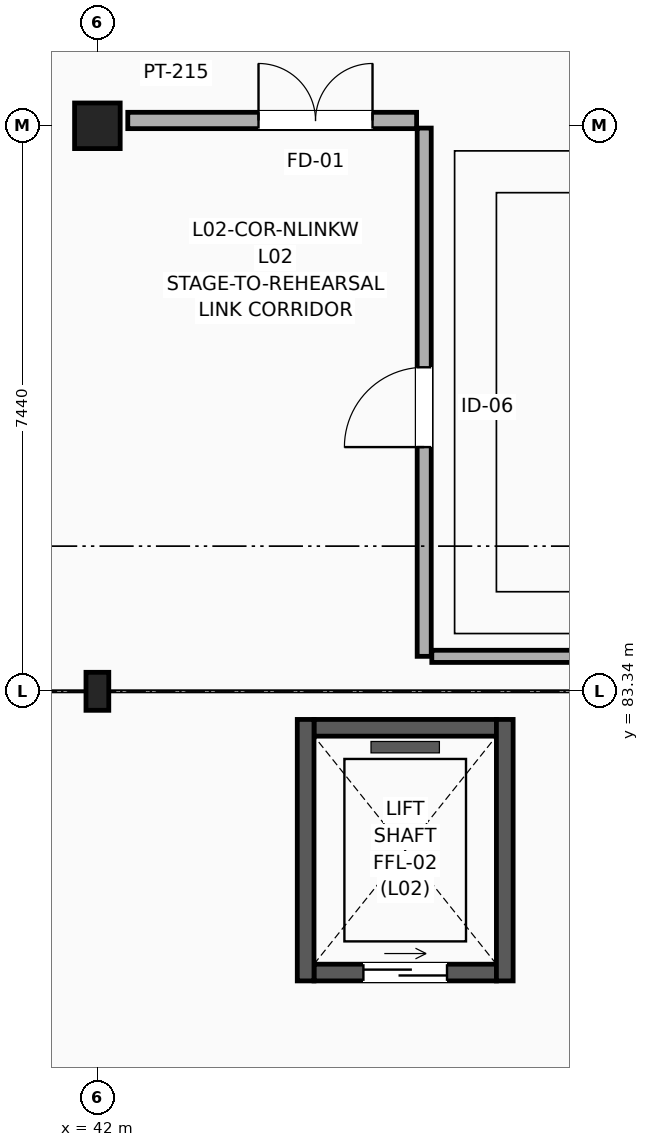
"""IFC4 building model, lengths in metres.
Left out: names, types, materials, properties, quantities, classifications, styles, units other than length and angle.
Written with IfcOpenShell. Run it as: python <this file> out.ifc"""

import sys

from ifc_helpers import new_model, si_unit, direction, frame, frame_2d, origin, origin_2d, place, context, subcontext, project, spatial, rectangle, i_section, extrude, element, fill, save


model = new_model("IFC4")
c1 = context("Model", 3, precision=1e-05, world=origin(), true_north=direction((0.0, 1.0)))
c2 = subcontext(c1, "Body", "Model", "MODEL_VIEW")
j1 = project(units=[si_unit("LENGTHUNIT", "METRE"), si_unit("PLANEANGLEUNIT", "RADIAN")], contexts=[c1])
p1 = place(None, origin())
s1 = spatial("IfcSite", under=j1, at=p1, CompositionType="ELEMENT")
p2 = place(p1, origin())
s2 = spatial("IfcBuilding", under=s1, at=p2, CompositionType="ELEMENT")
p3 = place(p2, frame((0.0, 0.0, 10.2)))
s3 = spatial("IfcBuildingStorey", under=s2, at=p3, CompositionType="ELEMENT", Elevation=10.2)
p4 = place(p3, frame((42.0, 83.34, 0.0), z_axis=(0.0, 0.0, 1.0), x_axis=(1.0, 0.0, 0.0)))
e1 = element("IfcColumn", 1, at=p4, inside=s3, PredefinedType="COLUMN", context=c2, shape_type="SweptSolid", body=[
    extrude(i_section(OverallWidth=0.3, OverallDepth=0.5, WebThickness=0.014, FlangeThickness=0.028, FilletRadius=0.027, at=origin_2d()), origin(), (0.0, 0.0, 1.0), 4.5),
])
p5 = place(p3, frame((42.0, 90.78, 0.0), z_axis=(0.0, 0.0, 1.0), x_axis=(1.0, 0.0, 0.0)))
e2 = element("IfcColumn", 2, at=p5, inside=s3, PredefinedType="COLUMN", context=c2, shape_type="SweptSolid", body=[
    extrude(rectangle(XDim=0.6, YDim=0.6, at=origin_2d()), origin(), (0.0, 0.0, 1.0), 4.5),
])
p6 = place(p3, frame((44.85, 79.64, 0.0), z_axis=(0.0, 0.0, 1.0), x_axis=(1.0, 0.0, 0.0)))
e3 = element("IfcWall", 3, at=p6, inside=s3, PredefinedType="SOLIDWALL", context=c2, shape_type="SweptSolid", body=[
    extrude(rectangle(XDim=2.4, YDim=0.22, at=frame_2d((1.2, 0.0))), origin(), (0.0, 0.0, 1.0), 4.225),
])
p7 = place(p6, frame((0.65, 0.0, 0.0)))
e4 = element("IfcOpeningElement", 4, at=p7, cuts=e3, PredefinedType="OPENING", context=c2, shape_type="SweptSolid", body=[
    extrude(rectangle(XDim=1.1, YDim=2.2, at=frame_2d((0.55, 1.1))), frame((0.0, 0.12, 0.0), z_axis=(0.0, -1.0, 0.0), x_axis=(1.0, 0.0, 0.0)), (0.0, 0.0, 1.0), 0.24),
])
p8 = place(p3, frame((44.85, 82.86, 0.0), z_axis=(0.0, 0.0, 1.0), x_axis=(1.0, 0.0, 0.0)))
e5 = element("IfcWall", 5, at=p8, inside=s3, PredefinedType="SOLIDWALL", context=c2, shape_type="SweptSolid", body=[
    extrude(rectangle(XDim=2.4, YDim=0.22, at=frame_2d((1.2, 0.0))), origin(), (0.0, 0.0, 1.0), 4.225),
])
for number, where, z_axis, x_axis in (
    (6, (44.74, 79.53, 0.0), (0.0, 0.0, 1.0), (0.0, 1.0, 0.0)),
    (7, (47.36, 79.53, 0.0), (0.0, 0.0, 1.0), (0.0, 1.0, 0.0)),
):
    element("IfcWall", number, at=place(p3, frame(where, z_axis=z_axis, x_axis=x_axis)), inside=s3, PredefinedType="SOLIDWALL", context=c2, shape_type="SweptSolid", body=[
        extrude(rectangle(XDim=3.44, YDim=0.22, at=frame_2d((1.72, 0.0))), origin(), (0.0, 0.0, 1.0), 4.225),
    ])
p9 = place(p3, frame((42.4, 90.85, 0.0), z_axis=(0.0, 0.0, 1.0), x_axis=(1.0, 0.0, 0.0)))
e8 = element("IfcWall", 8, at=p9, inside=s3, PredefinedType="PARTITIONING", context=c2, shape_type="SweptSolid", body=[
    extrude(rectangle(XDim=3.8, YDim=0.215, at=frame_2d((1.9, 0.0))), origin(), (0.0, 0.0, 1.0), 3.707),
])
p10 = place(p9, frame((1.72, 0.0, 0.0)))
e9 = element("IfcOpeningElement", 9, at=p10, cuts=e8, PredefinedType="OPENING", context=c2, shape_type="SweptSolid", body=[
    extrude(rectangle(XDim=1.5, YDim=2.2, at=frame_2d((0.75, 1.1))), frame((0.0, 0.117, 0.0), z_axis=(0.0, -1.0, 0.0), x_axis=(1.0, 0.0, 0.0)), (0.0, 0.0, 1.0), 0.235),
])
p11 = place(p3, frame((46.3, 83.8, 0.0), z_axis=(0.0, 0.0, 1.0), x_axis=(0.0, 1.0, 0.0)))
e10 = element("IfcWall", 10, at=p11, inside=s3, PredefinedType="PARTITIONING", context=c2, shape_type="SweptSolid", body=[
    extrude(rectangle(XDim=6.95, YDim=0.185, at=frame_2d((3.475, 0.0))), origin(), (0.0, 0.0, 1.0), 3.707),
])
p12 = place(p11, frame((2.753, 0.0, 0.0)))
e11 = element("IfcOpeningElement", 11, at=p12, cuts=e10, PredefinedType="OPENING", context=c2, shape_type="SweptSolid", body=[
    extrude(rectangle(XDim=1.05, YDim=2.25, at=frame_2d((0.525, 1.125))), frame((0.0, 0.103, 0.0), z_axis=(0.0, -1.0, 0.0), x_axis=(1.0, 0.0, 0.0)), (0.0, 0.0, 1.0), 0.205),
])
p13 = place(p3, frame((46.4, 83.8, 0.0), z_axis=(0.0, 0.0, 1.0), x_axis=(1.0, 0.0, 0.0)))
e12 = element("IfcWall", 12, at=p13, inside=s3, PredefinedType="PARTITIONING", context=c2, shape_type="SweptSolid", body=[
    extrude(rectangle(XDim=19.4, YDim=0.16, at=frame_2d((9.7, 0.0))), origin(), (0.0, 0.0, 1.0), 3.607),
])
p14 = place(p7, origin())
e13 = element("IfcDoor", 13, at=p14, inside=s3, OperationType="SLIDING_TO_LEFT", PredefinedType="DOOR", context=c2, shape_type="SweptSolid", body=[
    extrude(rectangle(XDim=1.1, YDim=2.2, at=frame_2d((0.55, 1.1))), frame((0.0, 0.025, 0.0), z_axis=(0.0, -1.0, 0.0), x_axis=(1.0, 0.0, 0.0)), (0.0, 0.0, 1.0), 0.05),
])
fill(e4, e13)
p15 = place(p10, origin())
e14 = element("IfcDoor", 14, at=p15, inside=s3, OperationType="DOUBLE_DOOR_SINGLE_SWING", PredefinedType="DOOR", context=c2, shape_type="SweptSolid", body=[
    extrude(rectangle(XDim=1.5, YDim=2.2, at=frame_2d((0.75, 1.1))), frame((0.0, 0.025, 0.0), z_axis=(0.0, -1.0, 0.0), x_axis=(1.0, 0.0, 0.0)), (0.0, 0.0, 1.0), 0.05),
])
fill(e9, e14)
p16 = place(p12, origin())
e15 = element("IfcDoor", 15, at=p16, inside=s3, OperationType="SINGLE_SWING_LEFT", PredefinedType="DOOR", context=c2, shape_type="SweptSolid", body=[
    extrude(rectangle(XDim=1.05, YDim=2.25, at=frame_2d((0.525, 1.125))), frame((0.0, 0.025, 0.0), z_axis=(0.0, -1.0, 0.0), x_axis=(1.0, 0.0, 0.0)), (0.0, 0.0, 1.0), 0.05),
])
fill(e11, e15)
save(model, sys.argv[1])
